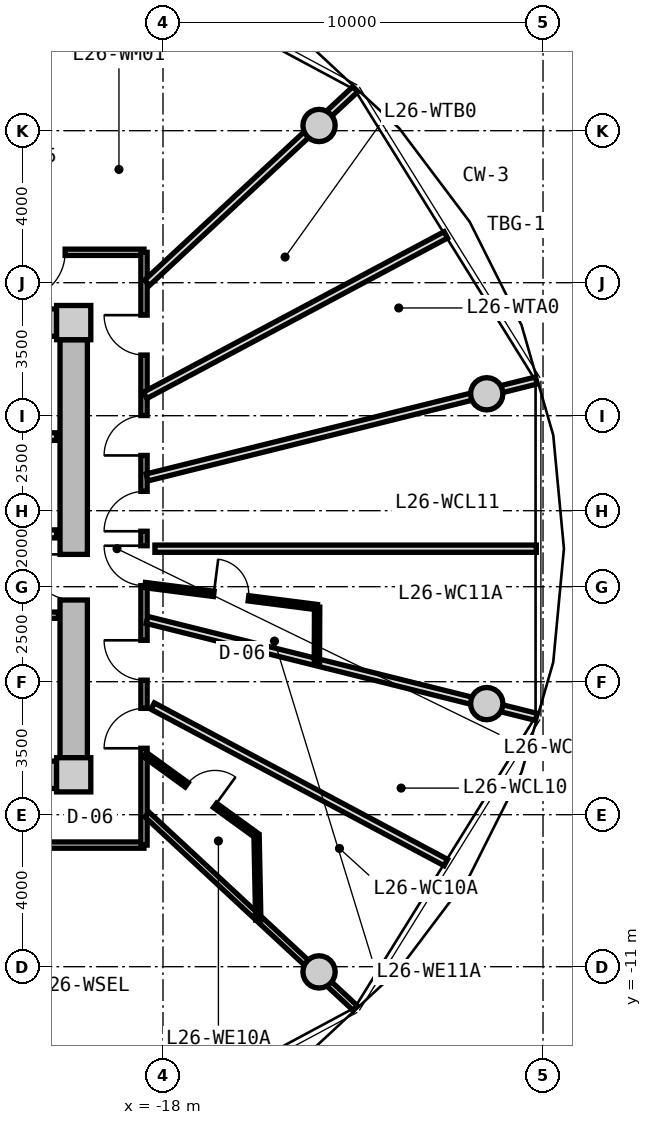
"""IFC4 building model, lengths in metres.
Left out: names, types, materials, properties, quantities, classifications, styles, units other than length and angle.
Written with IfcOpenShell. Run it as: python <this file> out.ifc"""

import sys

from ifc_helpers import new_model, si_unit, direction, frame, frame_2d, origin, origin_2d, place, context, subcontext, project, spatial, rectangle, circle, extrude, source, transform, mapped, element, fill, save


model = new_model("IFC4")
c1 = context("Model", 3, precision=1e-05, world=origin(), true_north=direction((0.0, 1.0)))
c2 = subcontext(c1, "Body", "Model", "MODEL_VIEW")
j1 = project(units=[si_unit("LENGTHUNIT", "METRE"), si_unit("PLANEANGLEUNIT", "RADIAN")], contexts=[c1])
p1 = place(None, origin())
s1 = spatial("IfcSite", under=j1, at=p1, CompositionType="ELEMENT")
p2 = place(p1, origin())
s2 = spatial("IfcBuilding", under=s1, at=p2, CompositionType="ELEMENT")
p3 = place(p2, frame((0.0, 0.0, 87.1)))
s3 = spatial("IfcBuildingStorey", under=s2, at=p3, CompositionType="ELEMENT", Elevation=87.1)
m1 = source(origin(), c2, "Body", "SweptSolid", [
    extrude(rectangle(XDim=0.9, YDim=0.9, at=origin_2d()), origin(), (0.0, 0.0, 1.0), 3.05),
])
for number, where, z_axis, x_axis in (
    (1, (-20.35, -5.95, 0.0), (0.0, 0.0, 1.0), (1.0, 0.0, 0.0)),
    (2, (-20.35, 5.95, 0.0), (0.0, 0.0, 1.0), (1.0, 0.0, 0.0)),
):
    element("IfcColumn", number, at=place(p3, frame(where, z_axis=z_axis, x_axis=x_axis)), inside=s3, PredefinedType="COLUMN", context=c2, shape_type="MappedRepresentation", body=[
        mapped(m1, transform((0.0, 0.0, 0.0), x_axis=(1.0, 0.0, 0.0), y_axis=(0.0, 1.0, 0.0), z_axis=(0.0, 0.0, 1.0), scale=1.0)),
    ])
m2 = source(origin(), c2, "Body", "SweptSolid", [
    extrude(rectangle(XDim=14.4, YDim=0.72, at=frame_2d((7.2, 0.0))), origin(), (0.0, 0.0, 1.0), 2.79),
])
for number, where, z_axis, x_axis in (
    (3, (-35.2, 5.95, 0.0), (0.0, 0.0, 1.0), (1.0, 0.0, 0.0)),
    (4, (-20.8, -5.95, 0.0), (0.0, 0.0, 1.0), (-1.0, 0.0, 0.0)),
):
    element("IfcWall", number, at=place(p3, frame(where, z_axis=z_axis, x_axis=x_axis)), inside=s3, PredefinedType="SHEAR", context=c2, shape_type="MappedRepresentation", body=[
        mapped(m2, transform((0.0, 0.0, 0.0), x_axis=(1.0, 0.0, 0.0), y_axis=(0.0, 1.0, 0.0), z_axis=(0.0, 0.0, 1.0), scale=1.0)),
    ])
m3 = source(origin(), c2, "Body", "SweptSolid", [
    extrude(rectangle(XDim=11.0, YDim=0.72, at=frame_2d((5.5, 0.0))), origin(), (0.0, 0.0, 1.0), 2.79),
])
p4 = place(p3, frame((-20.35, 5.5, 0.0), z_axis=(0.0, 0.0, 1.0), x_axis=(0.0, -1.0, 0.0)))
e5 = element("IfcWall", 5, at=p4, inside=s3, PredefinedType="SHEAR", context=c2, shape_type="MappedRepresentation", body=[
    mapped(m3, transform((0.0, 0.0, 0.0), x_axis=(1.0, 0.0, 0.0), y_axis=(0.0, 1.0, 0.0), z_axis=(0.0, 0.0, 1.0), scale=1.0)),
])
p5 = place(p4, frame((5.65, 0.0, 0.0)))
e6 = element("IfcOpeningElement", 6, at=p5, cuts=e5, PredefinedType="OPENING", context=c2, shape_type="SweptSolid", body=[
    extrude(rectangle(XDim=1.2, YDim=2.15, at=frame_2d((0.6, 1.075))), frame((0.0, 0.37, 0.0), z_axis=(0.0, -1.0, 0.0), x_axis=(1.0, 0.0, 0.0)), (0.0, 0.0, 1.0), 0.74),
])
m4 = source(origin(), c2, "Body", "SweptSolid", [
    extrude(circle(Radius=0.425, at=origin_2d()), origin(), (0.0, 0.0, 1.0), 3.05),
])
for number, where, z_axis, x_axis in (
    (7, (-9.481, 4.076, 0.0), (0.0, 0.0, 1.0), (1.0, 0.0, 0.0)),
    (8, (-13.894, 11.137, 0.0), (0.0, 0.0, 1.0), (1.0, 0.0, 0.0)),
    (9, (-13.894, -11.137, 0.0), (0.0, 0.0, 1.0), (1.0, 0.0, 0.0)),
    (10, (-9.481, -4.076, 0.0), (0.0, 0.0, 1.0), (1.0, 0.0, 0.0)),
):
    element("IfcColumn", number, at=place(p3, frame(where, z_axis=z_axis, x_axis=x_axis)), inside=s3, PredefinedType="COLUMN", context=c2, shape_type="MappedRepresentation", body=[
        mapped(m4, transform((0.0, 0.0, 0.0), x_axis=(1.0, 0.0, 0.0), y_axis=(0.0, 1.0, 0.0), z_axis=(0.0, 0.0, 1.0), scale=1.0)),
    ])
m5 = source(origin(), c2, "Body", "SweptSolid", [
    extrude(rectangle(XDim=3.2, YDim=0.2, at=frame_2d((1.6, 0.0))), origin(), (0.0, 0.0, 1.0), 2.775),
])
p6 = place(p3, frame((-24.0, 2.95, 0.0), z_axis=(0.0, 0.0, 1.0), x_axis=(1.0, 0.0, 0.0)))
e11 = element("IfcWall", 11, at=p6, inside=s3, PredefinedType="PARTITIONING", context=c2, shape_type="MappedRepresentation", body=[
    mapped(m5, transform((0.0, 0.0, 0.0), x_axis=(1.0, 0.0, 0.0), y_axis=(0.0, 1.0, 0.0), z_axis=(0.0, 0.0, 1.0), scale=1.0)),
])
m6 = source(origin(), c2, "Body", "SweptSolid", [
    extrude(rectangle(XDim=6.66, YDim=0.21, at=frame_2d((3.33, 0.0))), origin(), (0.0, 0.0, 1.0), 2.775),
])
p7 = place(p3, frame((-27.46, 0.39, 0.0), z_axis=(0.0, 0.0, 1.0), x_axis=(1.0, 0.0, 0.0)))
e12 = element("IfcWall", 12, at=p7, inside=s3, PredefinedType="PARTITIONING", context=c2, shape_type="MappedRepresentation", body=[
    mapped(m6, transform((0.0, 0.0, 0.0), x_axis=(1.0, 0.0, 0.0), y_axis=(0.0, 1.0, 0.0), z_axis=(0.0, 0.0, 1.0), scale=1.0)),
])
p8 = place(p7, frame((1.0, 0.0, 0.0)))
e13 = element("IfcOpeningElement", 13, at=p8, cuts=e12, PredefinedType="OPENING", context=c2, shape_type="SweptSolid", body=[
    extrude(rectangle(XDim=1.2, YDim=2.15, at=frame_2d((0.6, 1.075))), frame((0.0, 0.115, 0.0), z_axis=(0.0, -1.0, 0.0), x_axis=(1.0, 0.0, 0.0)), (0.0, 0.0, 1.0), 0.23),
])
m7 = source(origin(), c2, "Body", "SweptSolid", [
    extrude(rectangle(XDim=2.7, YDim=0.165, at=frame_2d((1.35, 0.0))), origin(), (0.0, 0.0, 1.0), 2.775),
])
p9 = place(p3, frame((-23.45, -1.75, 0.0), z_axis=(0.0, 0.0, 1.0), x_axis=(1.0, 0.0, 0.0)))
e14 = element("IfcWall", 14, at=p9, inside=s3, PredefinedType="PARTITIONING", context=c2, shape_type="MappedRepresentation", body=[
    mapped(m7, transform((0.0, 0.0, 0.0), x_axis=(1.0, 0.0, 0.0), y_axis=(0.0, 1.0, 0.0), z_axis=(0.0, 0.0, 1.0), scale=1.0)),
])
p10 = place(p9, frame((0.222, 0.0, 0.0)))
e15 = element("IfcOpeningElement", 15, at=p10, cuts=e14, PredefinedType="OPENING", context=c2, shape_type="SweptSolid", body=[
    extrude(rectangle(XDim=0.925, YDim=2.1, at=frame_2d((0.462, 1.05))), frame((0.0, 0.093, 0.0), z_axis=(0.0, -1.0, 0.0), x_axis=(1.0, 0.0, 0.0)), (0.0, 0.0, 1.0), 0.185),
])
p11 = place(p9, frame((1.522, 0.0, 0.0)))
e16 = element("IfcOpeningElement", 16, at=p11, cuts=e14, PredefinedType="OPENING", context=c2, shape_type="SweptSolid", body=[
    extrude(rectangle(XDim=0.925, YDim=2.1, at=frame_2d((0.462, 1.05))), frame((0.0, 0.093, 0.0), z_axis=(0.0, -1.0, 0.0), x_axis=(1.0, 0.0, 0.0)), (0.0, 0.0, 1.0), 0.185),
])
m8 = source(origin(), c2, "Body", "SweptSolid", [
    extrude(rectangle(XDim=8.6, YDim=0.165, at=frame_2d((4.3, 0.0))), origin(), (0.0, 0.0, 1.0), 2.775),
])
p12 = place(p3, frame((-27.1, 7.8, 0.0), z_axis=(0.0, 0.0, 1.0), x_axis=(1.0, 0.0, 0.0)))
e17 = element("IfcWall", 17, at=p12, inside=s3, PredefinedType="PARTITIONING", context=c2, shape_type="MappedRepresentation", body=[
    mapped(m8, transform((0.0, 0.0, 0.0), x_axis=(1.0, 0.0, 0.0), y_axis=(0.0, 1.0, 0.0), z_axis=(0.0, 0.0, 1.0), scale=1.0)),
])
p13 = place(p12, frame((5.275, 0.0, 0.0)))
e18 = element("IfcOpeningElement", 18, at=p13, cuts=e17, PredefinedType="OPENING", context=c2, shape_type="SweptSolid", body=[
    extrude(rectangle(XDim=1.25, YDim=2.2, at=frame_2d((0.625, 1.1))), frame((0.0, 0.093, 0.0), z_axis=(0.0, -1.0, 0.0), x_axis=(1.0, 0.0, 0.0)), (0.0, 0.0, 1.0), 0.185),
])
p14 = place(p3, frame((-18.5, -7.8, 0.0), z_axis=(0.0, 0.0, 1.0), x_axis=(-1.0, 0.0, 0.0)))
e19 = element("IfcWall", 19, at=p14, inside=s3, PredefinedType="PARTITIONING", context=c2, shape_type="MappedRepresentation", body=[
    mapped(m8, transform((0.0, 0.0, 0.0), x_axis=(1.0, 0.0, 0.0), y_axis=(0.0, 1.0, 0.0), z_axis=(0.0, 0.0, 1.0), scale=1.0)),
])
p15 = place(p14, frame((3.775, 0.0, 0.0)))
e20 = element("IfcOpeningElement", 20, at=p15, cuts=e19, PredefinedType="OPENING", context=c2, shape_type="SweptSolid", body=[
    extrude(rectangle(XDim=1.05, YDim=2.15, at=frame_2d((0.525, 1.075))), frame((0.0, 0.093, 0.0), z_axis=(0.0, -1.0, 0.0), x_axis=(1.0, 0.0, 0.0)), (0.0, 0.0, 1.0), 0.185),
])
m9 = source(origin(), c2, "Body", "SweptSolid", [
    extrude(rectangle(XDim=15.6, YDim=0.165, at=frame_2d((7.8, 0.0))), origin(), (0.0, 0.0, 1.0), 2.775),
])
p16 = place(p3, frame((-18.5, 7.8, 0.0), z_axis=(0.0, 0.0, 1.0), x_axis=(0.0, -1.0, 0.0)))
e21 = element("IfcWall", 21, at=p16, inside=s3, PredefinedType="PARTITIONING", context=c2, shape_type="MappedRepresentation", body=[
    mapped(m9, transform((0.0, 0.0, 0.0), x_axis=(1.0, 0.0, 0.0), y_axis=(0.0, 1.0, 0.0), z_axis=(0.0, 0.0, 1.0), scale=1.0)),
])
p17 = place(p16, frame((12.002, 0.0, 0.0)))
e22 = element("IfcOpeningElement", 22, at=p17, cuts=e21, PredefinedType="OPENING", context=c2, shape_type="SweptSolid", body=[
    extrude(rectangle(XDim=1.05, YDim=2.15, at=frame_2d((0.525, 1.075))), frame((0.0, 0.093, 0.0), z_axis=(0.0, -1.0, 0.0), x_axis=(1.0, 0.0, 0.0)), (0.0, 0.0, 1.0), 0.185),
])
p18 = place(p16, frame((10.211, 0.0, 0.0)))
e23 = element("IfcOpeningElement", 23, at=p18, cuts=e21, PredefinedType="OPENING", context=c2, shape_type="SweptSolid", body=[
    extrude(rectangle(XDim=1.05, YDim=2.15, at=frame_2d((0.525, 1.075))), frame((0.0, 0.093, 0.0), z_axis=(0.0, -1.0, 0.0), x_axis=(1.0, 0.0, 0.0)), (0.0, 0.0, 1.0), 0.185),
])
p19 = place(p16, frame((7.722, 0.0, 0.0)))
e24 = element("IfcOpeningElement", 24, at=p19, cuts=e21, PredefinedType="OPENING", context=c2, shape_type="SweptSolid", body=[
    extrude(rectangle(XDim=1.05, YDim=2.15, at=frame_2d((0.525, 1.075))), frame((0.0, 0.093, 0.0), z_axis=(0.0, -1.0, 0.0), x_axis=(1.0, 0.0, 0.0)), (0.0, 0.0, 1.0), 0.185),
])
p20 = place(p16, frame((6.291, 0.0, 0.0)))
e25 = element("IfcOpeningElement", 25, at=p20, cuts=e21, PredefinedType="OPENING", context=c2, shape_type="SweptSolid", body=[
    extrude(rectangle(XDim=1.05, YDim=2.15, at=frame_2d((0.525, 1.075))), frame((0.0, 0.093, 0.0), z_axis=(0.0, -1.0, 0.0), x_axis=(1.0, 0.0, 0.0)), (0.0, 0.0, 1.0), 0.185),
])
p21 = place(p16, frame((4.296, 0.0, 0.0)))
e26 = element("IfcOpeningElement", 26, at=p21, cuts=e21, PredefinedType="OPENING", context=c2, shape_type="SweptSolid", body=[
    extrude(rectangle(XDim=1.05, YDim=2.15, at=frame_2d((0.525, 1.075))), frame((0.0, 0.093, 0.0), z_axis=(0.0, -1.0, 0.0), x_axis=(1.0, 0.0, 0.0)), (0.0, 0.0, 1.0), 0.185),
])
p22 = place(p16, frame((1.654, 0.0, 0.0)))
e27 = element("IfcOpeningElement", 27, at=p22, cuts=e21, PredefinedType="OPENING", context=c2, shape_type="SweptSolid", body=[
    extrude(rectangle(XDim=1.05, YDim=2.15, at=frame_2d((0.525, 1.075))), frame((0.0, 0.093, 0.0), z_axis=(0.0, -1.0, 0.0), x_axis=(1.0, 0.0, 0.0)), (0.0, 0.0, 1.0), 0.185),
])
m10 = source(origin(), c2, "Body", "SweptSolid", [
    extrude(rectangle(XDim=7.482, YDim=0.165, at=frame_2d((3.741, 0.0))), origin(), (0.0, 0.0, 1.0), 2.275),
])
p23 = place(p3, frame((-18.42, -6.998, 0.0), z_axis=(0.0, 0.0, 1.0), x_axis=(0.732508698043, -0.680757671489, 0.0)))
e28 = element("IfcWall", 28, at=p23, inside=s3, PredefinedType="PARTITIONING", context=c2, shape_type="MappedRepresentation", body=[
    mapped(m10, transform((0.0, 0.0, 0.0), x_axis=(1.0, 0.0, 0.0), y_axis=(0.0, 1.0, 0.0), z_axis=(0.0, 0.0, 1.0), scale=1.0)),
])
m11 = source(origin(), c2, "Body", "SweptSolid", [
    extrude(rectangle(XDim=10.556, YDim=0.19, at=frame_2d((5.278, 0.0))), origin(), (0.0, 0.0, 1.0), 2.275),
])
p24 = place(p3, frame((-18.42, -1.875, 0.0), z_axis=(0.0, 0.0, 1.0), x_axis=(0.970363857851, -0.241648470667, 0.0)))
e29 = element("IfcWall", 29, at=p24, inside=s3, PredefinedType="PARTITIONING", context=c2, shape_type="MappedRepresentation", body=[
    mapped(m11, transform((0.0, 0.0, 0.0), x_axis=(1.0, 0.0, 0.0), y_axis=(0.0, 1.0, 0.0), z_axis=(0.0, 0.0, 1.0), scale=1.0)),
])
m12 = source(origin(), c2, "Body", "SweptSolid", [
    extrude(rectangle(XDim=8.744, YDim=0.19, at=frame_2d((4.372, 0.0))), origin(), (0.0, 0.0, 1.0), 2.775),
])
p25 = place(p3, frame((-18.273, -4.142, 0.0), z_axis=(0.0, 0.0, 1.0), x_axis=(0.882252449936, -0.470776607938, 0.0)))
e30 = element("IfcWall", 30, at=p25, inside=s3, PredefinedType="PARTITIONING", context=c2, shape_type="MappedRepresentation", body=[
    mapped(m12, transform((0.0, 0.0, 0.0), x_axis=(1.0, 0.0, 0.0), y_axis=(0.0, 1.0, 0.0), z_axis=(0.0, 0.0, 1.0), scale=1.0)),
])
m13 = source(origin(), c2, "Body", "SweptSolid", [
    extrude(rectangle(XDim=3.621, YDim=0.14, at=frame_2d((1.811, 0.0))), origin(), (0.0, 0.0, 1.0), 2.775),
])
p26 = place(p3, frame((-18.47, -5.422, 0.0), z_axis=(0.0, 0.0, 1.0), x_axis=(0.80968252222, -0.586868139544, 0.0)))
e31 = element("IfcWall", 31, at=p26, inside=s3, PredefinedType="PARTITIONING", context=c2, shape_type="MappedRepresentation", body=[
    mapped(m13, transform((0.0, 0.0, 0.0), x_axis=(1.0, 0.0, 0.0), y_axis=(0.0, 1.0, 0.0), z_axis=(0.0, 0.0, 1.0), scale=1.0)),
])
p27 = place(p26, frame((1.351, 0.0, 0.0)))
e32 = element("IfcOpeningElement", 32, at=p27, cuts=e31, PredefinedType="OPENING", context=c2, shape_type="SweptSolid", body=[
    extrude(rectangle(XDim=0.92, YDim=2.1, at=frame_2d((0.46, 1.05))), frame((0.0, 0.08, 0.0), z_axis=(0.0, -1.0, 0.0), x_axis=(1.0, 0.0, 0.0)), (0.0, 0.0, 1.0), 0.16),
])
m14 = source(origin(), c2, "Body", "SweptSolid", [
    extrude(rectangle(XDim=2.225, YDim=0.14, at=frame_2d((1.112, 0.0))), origin(), (0.0, 0.0, 1.0), 2.775),
])
p28 = place(p3, frame((-15.538, -7.547, 0.0), z_axis=(0.0, 0.0, 1.0), x_axis=(0.019971869027, -0.999800542332, 0.0)))
e33 = element("IfcWall", 33, at=p28, inside=s3, PredefinedType="PARTITIONING", context=c2, shape_type="MappedRepresentation", body=[
    mapped(m14, transform((0.0, 0.0, 0.0), x_axis=(1.0, 0.0, 0.0), y_axis=(0.0, 1.0, 0.0), z_axis=(0.0, 0.0, 1.0), scale=1.0)),
])
p29 = place(p3, frame((-18.42, 1.875, 0.0), z_axis=(0.0, 0.0, 1.0), x_axis=(0.970363857851, 0.241648470667, 0.0)))
e34 = element("IfcWall", 34, at=p29, inside=s3, PredefinedType="PARTITIONING", context=c2, shape_type="MappedRepresentation", body=[
    mapped(m11, transform((0.0, 0.0, 0.0), x_axis=(1.0, 0.0, 0.0), y_axis=(0.0, 1.0, 0.0), z_axis=(0.0, 0.0, 1.0), scale=1.0)),
])
m15 = source(origin(), c2, "Body", "SweptSolid", [
    extrude(rectangle(XDim=10.036, YDim=0.19, at=frame_2d((5.018, 0.0))), origin(), (0.0, 0.0, 1.0), 2.775),
])
p30 = place(p3, frame((-18.213, 0.0, 0.0), z_axis=(0.0, 0.0, 1.0), x_axis=(1.0, 0.0, 0.0)))
e35 = element("IfcWall", 35, at=p30, inside=s3, PredefinedType="PARTITIONING", context=c2, shape_type="MappedRepresentation", body=[
    mapped(m15, transform((0.0, 0.0, 0.0), x_axis=(1.0, 0.0, 0.0), y_axis=(0.0, 1.0, 0.0), z_axis=(0.0, 0.0, 1.0), scale=1.0)),
])
m16 = source(origin(), c2, "Body", "SweptSolid", [
    extrude(rectangle(XDim=4.562, YDim=0.14, at=frame_2d((2.281, 0.0))), origin(), (0.0, 0.0, 1.0), 2.775),
])
p31 = place(p3, frame((-18.47, -0.958, 0.0), z_axis=(0.0, 0.0, 1.0), x_axis=(0.991904666356, -0.126984774129, 0.0)))
e36 = element("IfcWall", 36, at=p31, inside=s3, PredefinedType="PARTITIONING", context=c2, shape_type="MappedRepresentation", body=[
    mapped(m16, transform((0.0, 0.0, 0.0), x_axis=(1.0, 0.0, 0.0), y_axis=(0.0, 1.0, 0.0), z_axis=(0.0, 0.0, 1.0), scale=1.0)),
])
p32 = place(p31, frame((1.821, 0.0, 0.0)))
e37 = element("IfcOpeningElement", 37, at=p32, cuts=e36, PredefinedType="OPENING", context=c2, shape_type="SweptSolid", body=[
    extrude(rectangle(XDim=0.92, YDim=2.1, at=frame_2d((0.46, 1.05))), frame((0.0, 0.08, 0.0), z_axis=(0.0, -1.0, 0.0), x_axis=(1.0, 0.0, 0.0)), (0.0, 0.0, 1.0), 0.16),
])
m17 = source(origin(), c2, "Body", "SweptSolid", [
    extrude(rectangle(XDim=1.468, YDim=0.14, at=frame_2d((0.734, 0.0))), origin(), (0.0, 0.0, 1.0), 2.775),
])
p33 = place(p3, frame((-13.945, -1.537, 0.0), z_axis=(0.0, 0.0, 1.0), x_axis=(-0.00399198416, -0.999992031999, 0.0)))
e38 = element("IfcWall", 38, at=p33, inside=s3, PredefinedType="PARTITIONING", context=c2, shape_type="MappedRepresentation", body=[
    mapped(m17, transform((0.0, 0.0, 0.0), x_axis=(1.0, 0.0, 0.0), y_axis=(0.0, 1.0, 0.0), z_axis=(0.0, 0.0, 1.0), scale=1.0)),
])
m18 = source(origin(), c2, "Body", "SweptSolid", [
    extrude(rectangle(XDim=7.482, YDim=0.19, at=frame_2d((3.741, 0.0))), origin(), (0.0, 0.0, 1.0), 2.275),
])
p34 = place(p3, frame((-18.42, 6.998, 0.0), z_axis=(0.0, 0.0, 1.0), x_axis=(0.732508698043, 0.680757671489, 0.0)))
e39 = element("IfcWall", 39, at=p34, inside=s3, PredefinedType="PARTITIONING", context=c2, shape_type="MappedRepresentation", body=[
    mapped(m18, transform((0.0, 0.0, 0.0), x_axis=(1.0, 0.0, 0.0), y_axis=(0.0, 1.0, 0.0), z_axis=(0.0, 0.0, 1.0), scale=1.0)),
])
m19 = source(origin(), c2, "Body", "SweptSolid", [
    extrude(rectangle(XDim=8.968, YDim=0.19, at=frame_2d((4.484, 0.0))), origin(), (0.0, 0.0, 1.0), 2.775),
])
p35 = place(p3, frame((-18.47, 4.036, 0.0), z_axis=(0.0, 0.0, 1.0), x_axis=(0.882202936563, 0.47086938605, 0.0)))
e40 = element("IfcWall", 40, at=p35, inside=s3, PredefinedType="PARTITIONING", context=c2, shape_type="MappedRepresentation", body=[
    mapped(m19, transform((0.0, 0.0, 0.0), x_axis=(1.0, 0.0, 0.0), y_axis=(0.0, 1.0, 0.0), z_axis=(0.0, 0.0, 1.0), scale=1.0)),
])
m20 = source(origin(), c2, "Body", "SweptSolid", [
    extrude(rectangle(XDim=1.2, YDim=2.15, at=frame_2d((0.6, 1.075))), frame((0.0, 0.025, 0.0), z_axis=(0.0, -1.0, 0.0), x_axis=(1.0, 0.0, 0.0)), (0.0, 0.0, 1.0), 0.05),
])
p36 = place(p5, frame((1.2, 0.0, 0.0), z_axis=(0.0, 0.0, 1.0), x_axis=(-1.0, 0.0, 0.0)))
e41 = element("IfcDoor", 41, at=p36, inside=s3, OperationType="SINGLE_SWING_RIGHT", PredefinedType="DOOR", context=c2, shape_type="MappedRepresentation", body=[
    mapped(m20, transform((0.0, 0.0, 0.0), x_axis=(1.0, 0.0, 0.0), y_axis=(0.0, 1.0, 0.0), z_axis=(0.0, 0.0, 1.0), scale=1.0)),
])
fill(e6, e41)
m21 = source(origin(), c2, "Body", "SweptSolid", [
    extrude(rectangle(XDim=1.05, YDim=2.15, at=frame_2d((0.525, 1.075))), frame((0.0, 0.025, 0.0), z_axis=(0.0, -1.0, 0.0), x_axis=(1.0, 0.0, 0.0)), (0.0, 0.0, 1.0), 0.05),
])
p37 = place(p17, frame((1.05, 0.0, 0.0), z_axis=(0.0, 0.0, 1.0), x_axis=(-1.0, 0.0, 0.0)))
e42 = element("IfcDoor", 42, at=p37, inside=s3, OperationType="SINGLE_SWING_LEFT", PredefinedType="DOOR", context=c2, shape_type="MappedRepresentation", body=[
    mapped(m21, transform((0.0, 0.0, 0.0), x_axis=(1.0, 0.0, 0.0), y_axis=(0.0, 1.0, 0.0), z_axis=(0.0, 0.0, 1.0), scale=1.0)),
])
fill(e22, e42)
m22 = source(origin(), c2, "Body", "SweptSolid", [
    extrude(rectangle(XDim=0.92, YDim=2.1, at=frame_2d((0.46, 1.05))), frame((0.0, 0.025, 0.0), z_axis=(0.0, -1.0, 0.0), x_axis=(1.0, 0.0, 0.0)), (0.0, 0.0, 1.0), 0.05),
])
p38 = place(p27, origin())
e43 = element("IfcDoor", 43, at=p38, inside=s3, OperationType="SINGLE_SWING_RIGHT", PredefinedType="DOOR", context=c2, shape_type="MappedRepresentation", body=[
    mapped(m22, transform((0.0, 0.0, 0.0), x_axis=(1.0, 0.0, 0.0), y_axis=(0.0, 1.0, 0.0), z_axis=(0.0, 0.0, 1.0), scale=1.0)),
])
fill(e32, e43)
p39 = place(p18, frame((1.05, 0.0, 0.0), z_axis=(0.0, 0.0, 1.0), x_axis=(-1.0, 0.0, 0.0)))
e44 = element("IfcDoor", 44, at=p39, inside=s3, OperationType="SINGLE_SWING_RIGHT", PredefinedType="DOOR", context=c2, shape_type="MappedRepresentation", body=[
    mapped(m21, transform((0.0, 0.0, 0.0), x_axis=(1.0, 0.0, 0.0), y_axis=(0.0, 1.0, 0.0), z_axis=(0.0, 0.0, 1.0), scale=1.0)),
])
fill(e23, e44)
p40 = place(p19, frame((1.05, 0.0, 0.0), z_axis=(0.0, 0.0, 1.0), x_axis=(-1.0, 0.0, 0.0)))
e45 = element("IfcDoor", 45, at=p40, inside=s3, OperationType="SINGLE_SWING_RIGHT", PredefinedType="DOOR", context=c2, shape_type="MappedRepresentation", body=[
    mapped(m21, transform((0.0, 0.0, 0.0), x_axis=(1.0, 0.0, 0.0), y_axis=(0.0, 1.0, 0.0), z_axis=(0.0, 0.0, 1.0), scale=1.0)),
])
fill(e24, e45)
p41 = place(p32, origin())
e46 = element("IfcDoor", 46, at=p41, inside=s3, OperationType="SINGLE_SWING_LEFT", PredefinedType="DOOR", context=c2, shape_type="MappedRepresentation", body=[
    mapped(m22, transform((0.0, 0.0, 0.0), x_axis=(1.0, 0.0, 0.0), y_axis=(0.0, 1.0, 0.0), z_axis=(0.0, 0.0, 1.0), scale=1.0)),
])
fill(e37, e46)
p42 = place(p20, frame((1.05, 0.0, 0.0), z_axis=(0.0, 0.0, 1.0), x_axis=(-1.0, 0.0, 0.0)))
e47 = element("IfcDoor", 47, at=p42, inside=s3, OperationType="SINGLE_SWING_LEFT", PredefinedType="DOOR", context=c2, shape_type="MappedRepresentation", body=[
    mapped(m21, transform((0.0, 0.0, 0.0), x_axis=(1.0, 0.0, 0.0), y_axis=(0.0, 1.0, 0.0), z_axis=(0.0, 0.0, 1.0), scale=1.0)),
])
fill(e25, e47)
p43 = place(p21, frame((1.05, 0.0, 0.0), z_axis=(0.0, 0.0, 1.0), x_axis=(-1.0, 0.0, 0.0)))
e48 = element("IfcDoor", 48, at=p43, inside=s3, OperationType="SINGLE_SWING_LEFT", PredefinedType="DOOR", context=c2, shape_type="MappedRepresentation", body=[
    mapped(m21, transform((0.0, 0.0, 0.0), x_axis=(1.0, 0.0, 0.0), y_axis=(0.0, 1.0, 0.0), z_axis=(0.0, 0.0, 1.0), scale=1.0)),
])
fill(e26, e48)
p44 = place(p22, frame((1.05, 0.0, 0.0), z_axis=(0.0, 0.0, 1.0), x_axis=(-1.0, 0.0, 0.0)))
e49 = element("IfcDoor", 49, at=p44, inside=s3, OperationType="SINGLE_SWING_RIGHT", PredefinedType="DOOR", context=c2, shape_type="MappedRepresentation", body=[
    mapped(m21, transform((0.0, 0.0, 0.0), x_axis=(1.0, 0.0, 0.0), y_axis=(0.0, 1.0, 0.0), z_axis=(0.0, 0.0, 1.0), scale=1.0)),
])
fill(e27, e49)
m23 = source(origin(), c2, "Body", "SweptSolid", [
    extrude(rectangle(XDim=1.25, YDim=2.2, at=frame_2d((0.625, 1.1))), frame((0.0, 0.025, 0.0), z_axis=(0.0, -1.0, 0.0), x_axis=(1.0, 0.0, 0.0)), (0.0, 0.0, 1.0), 0.05),
])
p45 = place(p13, frame((1.25, 0.0, 0.0), z_axis=(0.0, 0.0, 1.0), x_axis=(-1.0, 0.0, 0.0)))
e50 = element("IfcDoor", 50, at=p45, inside=s3, OperationType="SINGLE_SWING_RIGHT", PredefinedType="DOOR", context=c2, shape_type="MappedRepresentation", body=[
    mapped(m23, transform((0.0, 0.0, 0.0), x_axis=(1.0, 0.0, 0.0), y_axis=(0.0, 1.0, 0.0), z_axis=(0.0, 0.0, 1.0), scale=1.0)),
])
fill(e18, e50)
save(model, sys.argv[1])
